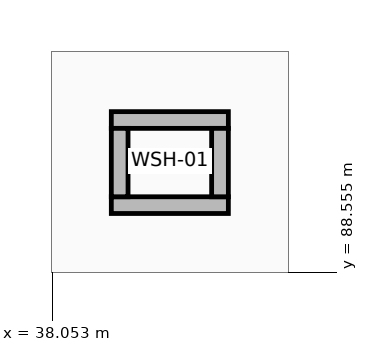
"""IFC4 building model, lengths in metres.
Left out: names, types, materials, properties, quantities, classifications, styles, units other than length and angle.
Written with IfcOpenShell. Run it as: python <this file> out.ifc"""

import sys

from ifc_helpers import new_model, si_unit, direction, frame, frame_2d, origin, place, context, subcontext, project, spatial, rectangle, extrude, element, save


model = new_model("IFC4")
c1 = context("Model", 3, precision=1e-05, world=origin(), true_north=direction((0.0, 1.0)))
c2 = subcontext(c1, "Body", "Model", "MODEL_VIEW")
j1 = project(units=[si_unit("LENGTHUNIT", "METRE"), si_unit("PLANEANGLEUNIT", "RADIAN")], contexts=[c1])
p1 = place(None, origin())
s1 = spatial("IfcSite", under=j1, at=p1, CompositionType="ELEMENT")
p2 = place(p1, origin())
s2 = spatial("IfcBuilding", under=s1, at=p2, CompositionType="ELEMENT")
p3 = place(p2, frame((0.0, 0.0, 4.5)))
s3 = spatial("IfcBuildingStorey", under=s2, at=p3, CompositionType="ELEMENT", Elevation=4.5)
for number, where, z_axis, x_axis in (
    (1, (38.83, 89.44, 0.0), (0.0, 0.0, 1.0), (1.0, 0.0, 0.0)),
    (2, (38.83, 90.56, 0.0), (0.0, 0.0, 1.0), (1.0, 0.0, 0.0)),
):
    element("IfcWall", number, at=place(p3, frame(where, z_axis=z_axis, x_axis=x_axis)), inside=s3, PredefinedType="STANDARD", context=c2, shape_type="SweptSolid", body=[
        extrude(rectangle(XDim=1.54, YDim=0.22, at=frame_2d((0.77, 0.0))), origin(), (0.0, 0.0, 1.0), 3.26),
    ])
for number, where, z_axis, x_axis in (
    (3, (38.94, 89.55, 0.0), (0.0, 0.0, 1.0), (0.0, 1.0, 0.0)),
    (4, (40.26, 89.55, 0.0), (0.0, 0.0, 1.0), (0.0, 1.0, 0.0)),
):
    element("IfcWall", number, at=place(p3, frame(where, z_axis=z_axis, x_axis=x_axis)), inside=s3, PredefinedType="STANDARD", context=c2, shape_type="SweptSolid", body=[
        extrude(rectangle(XDim=0.9, YDim=0.22, at=frame_2d((0.45, 0.0))), origin(), (0.0, 0.0, 1.0), 3.26),
    ])
save(model, sys.argv[1])
